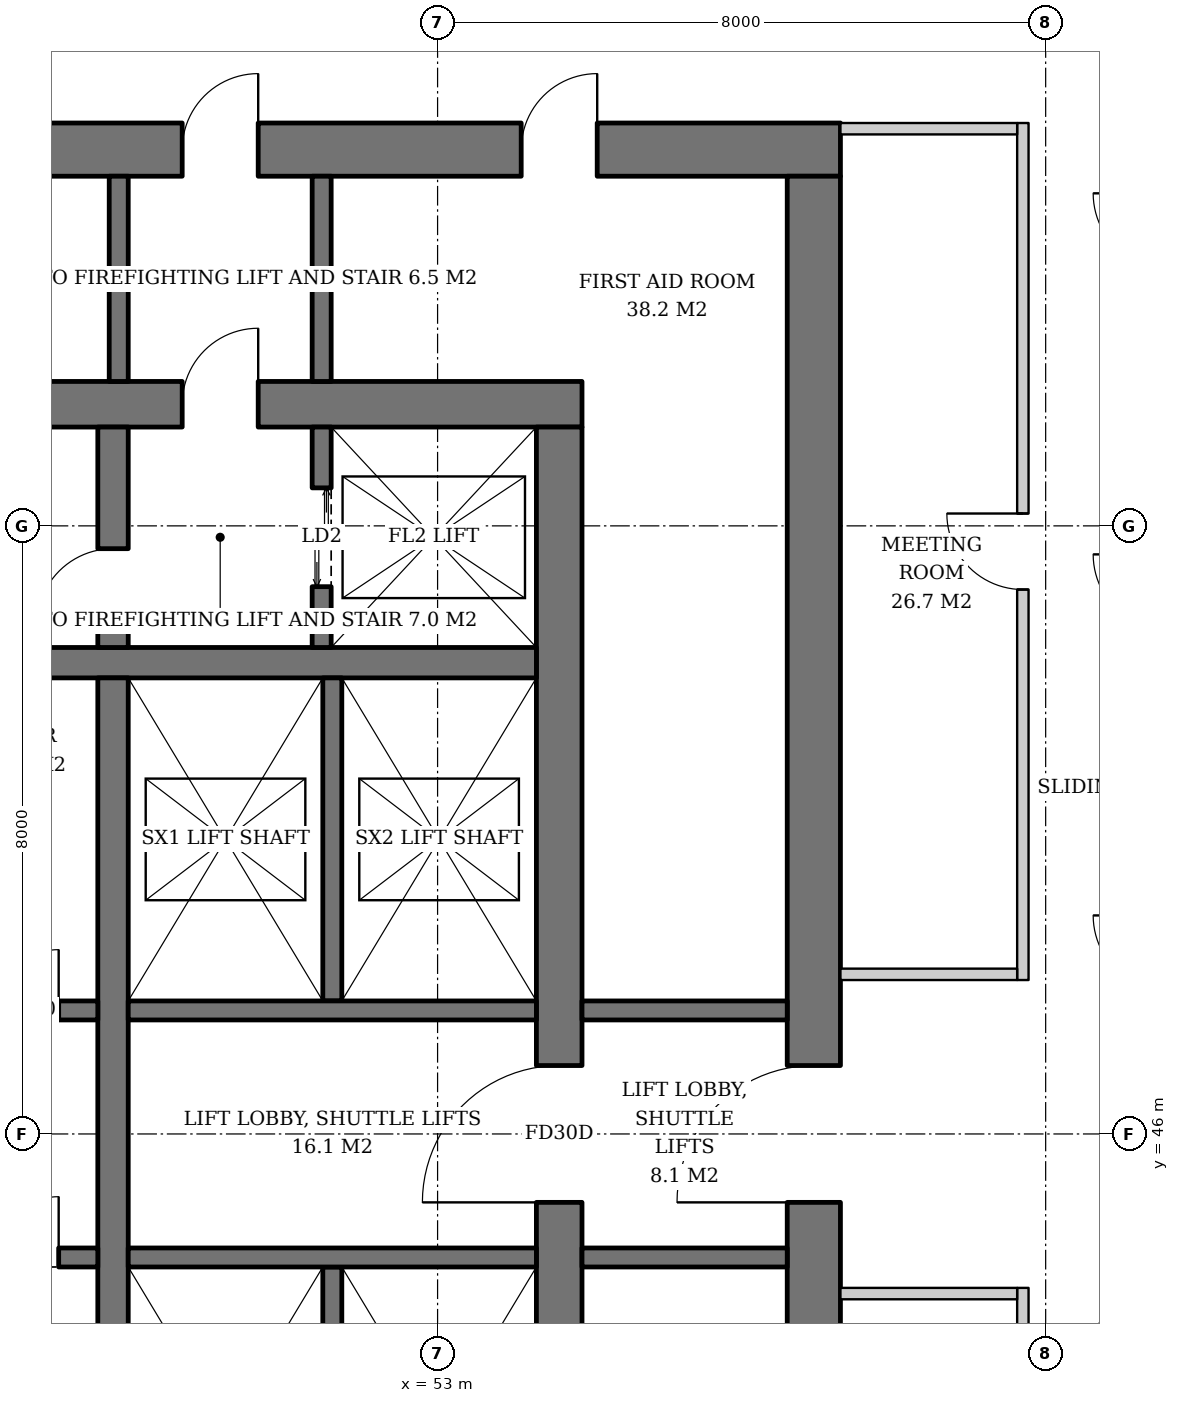
"""IFC4 building model, lengths in metres.
Left out: names, types, materials, properties, quantities, classifications, styles, units other than length and angle.
Written with IfcOpenShell. Run it as: python <this file> out.ifc"""

import sys

from ifc_helpers import new_model, si_unit, direction, frame, frame_2d, origin, place, context, subcontext, project, spatial, rectangle, extrude, element, fill, save


model = new_model("IFC4")
c1 = context("Model", 3, precision=1e-05, world=origin(), true_north=direction((0.0, 1.0)))
c2 = subcontext(c1, "Body", "Model", "MODEL_VIEW")
j1 = project(units=[si_unit("LENGTHUNIT", "METRE"), si_unit("PLANEANGLEUNIT", "RADIAN")], contexts=[c1])
p1 = place(None, origin())
s1 = spatial("IfcSite", under=j1, at=p1, CompositionType="ELEMENT")
p2 = place(p1, origin())
s2 = spatial("IfcBuilding", under=s1, at=p2, CompositionType="ELEMENT")
p3 = place(p2, frame((0.0, 0.0, 127.4)))
s3 = spatial("IfcBuildingStorey", under=s2, at=p3, CompositionType="ELEMENT", Elevation=127.4)
p4 = place(p3, frame((35.1, 55.6, 0.0), z_axis=(0.0, 0.0, 1.0), x_axis=(1.0, 0.0, 0.0)))
e1 = element("IfcWall", 1, at=p4, inside=s3, PredefinedType="SHEAR", context=c2, shape_type="SweptSolid", body=[
    extrude(rectangle(XDim=19.8, YDim=0.6, at=frame_2d((9.9, 0.0))), origin(), (0.0, 0.0, 1.0), 3.8),
])
p5 = place(p4, frame((14.54, 0.0, 0.0)))
e2 = element("IfcOpeningElement", 2, at=p5, cuts=e1, PredefinedType="OPENING", context=c2, shape_type="SweptSolid", body=[
    extrude(rectangle(XDim=1.0, YDim=2.1, at=frame_2d((0.5, 1.05))), frame((0.0, 0.31, 0.0), z_axis=(0.0, -1.0, 0.0), x_axis=(1.0, 0.0, 0.0)), (0.0, 0.0, 1.0), 0.62),
])
p6 = place(p4, frame((2.425, 0.0, 0.0)))
e3 = element("IfcOpeningElement", 3, at=p6, cuts=e1, PredefinedType="OPENING", context=c2, shape_type="SweptSolid", body=[
    extrude(rectangle(XDim=1.0, YDim=2.1, at=frame_2d((0.5, 1.05))), frame((0.0, 0.31, 0.0), z_axis=(0.0, -1.0, 0.0), x_axis=(1.0, 0.0, 0.0)), (0.0, 0.0, 1.0), 0.62),
])
p7 = place(p3, frame((54.6, 36.7, 0.0), z_axis=(0.0, 0.0, 1.0), x_axis=(0.0, 1.0, 0.0)))
e4 = element("IfcWall", 4, at=p7, inside=s3, PredefinedType="SHEAR", context=c2, shape_type="SweptSolid", body=[
    extrude(rectangle(XDim=18.6, YDim=0.6, at=frame_2d((9.3, 0.0))), origin(), (0.0, 0.0, 1.0), 3.8),
])
p8 = place(p7, frame((8.4, 0.0, 0.0)))
e5 = element("IfcOpeningElement", 5, at=p8, cuts=e4, PredefinedType="OPENING", context=c2, shape_type="SweptSolid", body=[
    extrude(rectangle(XDim=1.8, YDim=2.4, at=frame_2d((0.9, 1.2))), frame((0.0, 0.31, 0.0), z_axis=(0.0, -1.0, 0.0), x_axis=(1.0, 0.0, 0.0)), (0.0, 0.0, 1.0), 0.62),
])
p9 = place(p3, frame((31.7, 58.95, 0.0), z_axis=(0.0, 0.0, 1.0), x_axis=(1.0, 0.0, 0.0)))
e6 = element("IfcWall", 6, at=p9, inside=s3, PredefinedType="SHEAR", context=c2, shape_type="SweptSolid", body=[
    extrude(rectangle(XDim=26.6, YDim=0.7, at=frame_2d((13.3, 0.0))), origin(), (0.0, 0.0, 1.0), 3.8),
])
p10 = place(p9, frame((17.94, 0.0, 0.0)))
e7 = element("IfcOpeningElement", 7, at=p10, cuts=e6, PredefinedType="OPENING", context=c2, shape_type="SweptSolid", body=[
    extrude(rectangle(XDim=1.0, YDim=2.1, at=frame_2d((0.5, 1.05))), frame((0.0, 0.36, 0.0), z_axis=(0.0, -1.0, 0.0), x_axis=(1.0, 0.0, 0.0)), (0.0, 0.0, 1.0), 0.72),
])
p11 = place(p9, frame((5.825, 0.0, 0.0)))
e8 = element("IfcOpeningElement", 8, at=p11, cuts=e6, PredefinedType="OPENING", context=c2, shape_type="SweptSolid", body=[
    extrude(rectangle(XDim=1.0, YDim=2.1, at=frame_2d((0.5, 1.05))), frame((0.0, 0.36, 0.0), z_axis=(0.0, -1.0, 0.0), x_axis=(1.0, 0.0, 0.0)), (0.0, 0.0, 1.0), 0.72),
])
p12 = place(p9, frame((2.587, 0.0, 0.0)))
e9 = element("IfcOpeningElement", 9, at=p12, cuts=e6, PredefinedType="OPENING", context=c2, shape_type="SweptSolid", body=[
    extrude(rectangle(XDim=1.0, YDim=2.1, at=frame_2d((0.5, 1.05))), frame((0.0, 0.36, 0.0), z_axis=(0.0, -1.0, 0.0), x_axis=(1.0, 0.0, 0.0)), (0.0, 0.0, 1.0), 0.72),
])
p13 = place(p9, frame((8.44, 0.0, 0.0)))
e10 = element("IfcOpeningElement", 10, at=p13, cuts=e6, PredefinedType="OPENING", context=c2, shape_type="SweptSolid", body=[
    extrude(rectangle(XDim=1.0, YDim=2.1, at=frame_2d((0.5, 1.05))), frame((0.0, 0.36, 0.0), z_axis=(0.0, -1.0, 0.0), x_axis=(1.0, 0.0, 0.0)), (0.0, 0.0, 1.0), 0.72),
])
p14 = place(p9, frame((13.342, 0.0, 0.0)))
e11 = element("IfcOpeningElement", 11, at=p14, cuts=e6, PredefinedType="OPENING", context=c2, shape_type="SweptSolid", body=[
    extrude(rectangle(XDim=1.0, YDim=2.1, at=frame_2d((0.5, 1.05))), frame((0.0, 0.36, 0.0), z_axis=(0.0, -1.0, 0.0), x_axis=(1.0, 0.0, 0.0)), (0.0, 0.0, 1.0), 0.72),
])
p15 = place(p9, frame((22.4, 0.0, 0.0)))
e12 = element("IfcOpeningElement", 12, at=p15, cuts=e6, PredefinedType="OPENING", context=c2, shape_type="SweptSolid", body=[
    extrude(rectangle(XDim=1.0, YDim=2.1, at=frame_2d((0.5, 1.05))), frame((0.0, 0.36, 0.0), z_axis=(0.0, -1.0, 0.0), x_axis=(1.0, 0.0, 0.0)), (0.0, 0.0, 1.0), 0.72),
])
p16 = place(p3, frame((57.95, 33.4, 0.0), z_axis=(0.0, 0.0, 1.0), x_axis=(0.0, 1.0, 0.0)))
e13 = element("IfcWall", 13, at=p16, inside=s3, PredefinedType="SHEAR", context=c2, shape_type="SweptSolid", body=[
    extrude(rectangle(XDim=25.2, YDim=0.7, at=frame_2d((12.6, 0.0))), origin(), (0.0, 0.0, 1.0), 3.8),
])
p17 = place(p16, frame((11.7, 0.0, 0.0)))
e14 = element("IfcOpeningElement", 14, at=p17, cuts=e13, PredefinedType="OPENING", context=c2, shape_type="SweptSolid", body=[
    extrude(rectangle(XDim=1.8, YDim=2.4, at=frame_2d((0.9, 1.2))), frame((0.0, 0.36, 0.0), z_axis=(0.0, -1.0, 0.0), x_axis=(1.0, 0.0, 0.0)), (0.0, 0.0, 1.0), 0.72),
])
p18 = place(p3, frame((35.7, 52.2, 0.0), z_axis=(0.0, 0.0, 1.0), x_axis=(1.0, 0.0, 0.0)))
e15 = element("IfcWall", 15, at=p18, inside=s3, PredefinedType="SHEAR", context=c2, shape_type="SweptSolid", body=[
    extrude(rectangle(XDim=18.6, YDim=0.4, at=frame_2d((9.3, 0.0))), origin(), (0.0, 0.0, 1.0), 3.8),
])
p19 = place(p3, frame((48.73, 40.0, 0.0), z_axis=(0.0, 0.0, 1.0), x_axis=(0.0, 1.0, 0.0)))
e16 = element("IfcWall", 16, at=p19, inside=s3, PredefinedType="SHEAR", context=c2, shape_type="SweptSolid", body=[
    extrude(rectangle(XDim=12.0, YDim=0.4, at=frame_2d((6.0, 0.0))), origin(), (0.0, 0.0, 1.0), 3.8),
])
p20 = place(p3, frame((48.73, 52.4, 0.0), z_axis=(0.0, 0.0, 1.0), x_axis=(0.0, 1.0, 0.0)))
e17 = element("IfcWall", 17, at=p20, inside=s3, PredefinedType="SHEAR", context=c2, shape_type="SweptSolid", body=[
    extrude(rectangle(XDim=2.9, YDim=0.4, at=frame_2d((1.45, 0.0))), origin(), (0.0, 0.0, 1.0), 3.8),
])
p21 = place(p20, frame((0.3, 0.0, 0.0)))
e18 = element("IfcOpeningElement", 18, at=p21, cuts=e17, PredefinedType="OPENING", context=c2, shape_type="SweptSolid", body=[
    extrude(rectangle(XDim=1.0, YDim=2.1, at=frame_2d((0.5, 1.05))), frame((0.0, 0.21, 0.0), z_axis=(0.0, -1.0, 0.0), x_axis=(1.0, 0.0, 0.0)), (0.0, 0.0, 1.0), 0.42),
])
p22 = place(p3, frame((51.475, 52.4, 0.0), z_axis=(0.0, 0.0, 1.0), x_axis=(0.0, 1.0, 0.0)))
e19 = element("IfcWall", 19, at=p22, inside=s3, PredefinedType="SHEAR", context=c2, shape_type="SweptSolid", body=[
    extrude(rectangle(XDim=2.9, YDim=0.25, at=frame_2d((1.45, 0.0))), origin(), (0.0, 0.0, 1.0), 3.8),
])
p23 = place(p22, frame((0.8, 0.0, 0.0)))
e20 = element("IfcOpeningElement", 20, at=p23, cuts=e19, PredefinedType="OPENING", context=c2, shape_type="SweptSolid", body=[
    extrude(rectangle(XDim=1.3, YDim=2.2, at=frame_2d((0.65, 1.1))), frame((0.0, 0.135, 0.0), z_axis=(0.0, -1.0, 0.0), x_axis=(1.0, 0.0, 0.0)), (0.0, 0.0, 1.0), 0.27),
])
p24 = place(p3, frame((35.7, 47.625, 0.0), z_axis=(0.0, 0.0, 1.0), x_axis=(1.0, 0.0, 0.0)))
e21 = element("IfcWall", 21, at=p24, inside=s3, PredefinedType="SHEAR", context=c2, shape_type="SweptSolid", body=[
    extrude(rectangle(XDim=12.83, YDim=0.25, at=frame_2d((6.415, 0.0))), origin(), (0.0, 0.0, 1.0), 3.8),
])
p25 = place(p24, frame((0.7, 0.0, 0.0)))
e22 = element("IfcOpeningElement", 22, at=p25, cuts=e21, PredefinedType="OPENING", context=c2, shape_type="SweptSolid", body=[
    extrude(rectangle(XDim=1.1, YDim=2.2, at=frame_2d((0.55, 1.1))), frame((0.0, 0.135, 0.0), z_axis=(0.0, -1.0, 0.0), x_axis=(1.0, 0.0, 0.0)), (0.0, 0.0, 1.0), 0.27),
])
p26 = place(p24, frame((3.45, 0.0, 0.0)))
e23 = element("IfcOpeningElement", 23, at=p26, cuts=e21, PredefinedType="OPENING", context=c2, shape_type="SweptSolid", body=[
    extrude(rectangle(XDim=1.1, YDim=2.2, at=frame_2d((0.55, 1.1))), frame((0.0, 0.135, 0.0), z_axis=(0.0, -1.0, 0.0), x_axis=(1.0, 0.0, 0.0)), (0.0, 0.0, 1.0), 0.27),
])
p27 = place(p24, frame((6.2, 0.0, 0.0)))
e24 = element("IfcOpeningElement", 24, at=p27, cuts=e21, PredefinedType="OPENING", context=c2, shape_type="SweptSolid", body=[
    extrude(rectangle(XDim=1.1, YDim=2.2, at=frame_2d((0.55, 1.1))), frame((0.0, 0.135, 0.0), z_axis=(0.0, -1.0, 0.0), x_axis=(1.0, 0.0, 0.0)), (0.0, 0.0, 1.0), 0.27),
])
p28 = place(p24, frame((8.95, 0.0, 0.0)))
e25 = element("IfcOpeningElement", 25, at=p28, cuts=e21, PredefinedType="OPENING", context=c2, shape_type="SweptSolid", body=[
    extrude(rectangle(XDim=1.1, YDim=2.2, at=frame_2d((0.55, 1.1))), frame((0.0, 0.135, 0.0), z_axis=(0.0, -1.0, 0.0), x_axis=(1.0, 0.0, 0.0)), (0.0, 0.0, 1.0), 0.27),
])
p29 = place(p24, frame((11.515, 0.0, 0.0)))
e26 = element("IfcOpeningElement", 26, at=p29, cuts=e21, PredefinedType="OPENING", context=c2, shape_type="SweptSolid", body=[
    extrude(rectangle(XDim=0.8, YDim=2.0, at=frame_2d((0.4, 1.0))), frame((0.0, 0.135, 0.0), z_axis=(0.0, -1.0, 0.0), x_axis=(1.0, 0.0, 0.0)), (0.0, 0.0, 1.0), 0.27),
])
p30 = place(p3, frame((35.7, 44.375, 0.0), z_axis=(0.0, 0.0, 1.0), x_axis=(1.0, 0.0, 0.0)))
e27 = element("IfcWall", 27, at=p30, inside=s3, PredefinedType="SHEAR", context=c2, shape_type="SweptSolid", body=[
    extrude(rectangle(XDim=12.83, YDim=0.25, at=frame_2d((6.415, 0.0))), origin(), (0.0, 0.0, 1.0), 3.8),
])
p31 = place(p30, frame((0.7, 0.0, 0.0)))
e28 = element("IfcOpeningElement", 28, at=p31, cuts=e27, PredefinedType="OPENING", context=c2, shape_type="SweptSolid", body=[
    extrude(rectangle(XDim=1.1, YDim=2.2, at=frame_2d((0.55, 1.1))), frame((0.0, 0.135, 0.0), z_axis=(0.0, -1.0, 0.0), x_axis=(1.0, 0.0, 0.0)), (0.0, 0.0, 1.0), 0.27),
])
p32 = place(p30, frame((3.45, 0.0, 0.0)))
e29 = element("IfcOpeningElement", 29, at=p32, cuts=e27, PredefinedType="OPENING", context=c2, shape_type="SweptSolid", body=[
    extrude(rectangle(XDim=1.1, YDim=2.2, at=frame_2d((0.55, 1.1))), frame((0.0, 0.135, 0.0), z_axis=(0.0, -1.0, 0.0), x_axis=(1.0, 0.0, 0.0)), (0.0, 0.0, 1.0), 0.27),
])
p33 = place(p30, frame((6.2, 0.0, 0.0)))
e30 = element("IfcOpeningElement", 30, at=p33, cuts=e27, PredefinedType="OPENING", context=c2, shape_type="SweptSolid", body=[
    extrude(rectangle(XDim=1.1, YDim=2.2, at=frame_2d((0.55, 1.1))), frame((0.0, 0.135, 0.0), z_axis=(0.0, -1.0, 0.0), x_axis=(1.0, 0.0, 0.0)), (0.0, 0.0, 1.0), 0.27),
])
p34 = place(p30, frame((8.95, 0.0, 0.0)))
e31 = element("IfcOpeningElement", 31, at=p34, cuts=e27, PredefinedType="OPENING", context=c2, shape_type="SweptSolid", body=[
    extrude(rectangle(XDim=1.1, YDim=2.2, at=frame_2d((0.55, 1.1))), frame((0.0, 0.135, 0.0), z_axis=(0.0, -1.0, 0.0), x_axis=(1.0, 0.0, 0.0)), (0.0, 0.0, 1.0), 0.27),
])
p35 = place(p30, frame((11.515, 0.0, 0.0)))
e32 = element("IfcOpeningElement", 32, at=p35, cuts=e27, PredefinedType="OPENING", context=c2, shape_type="SweptSolid", body=[
    extrude(rectangle(XDim=0.8, YDim=2.0, at=frame_2d((0.4, 1.0))), frame((0.0, 0.135, 0.0), z_axis=(0.0, -1.0, 0.0), x_axis=(1.0, 0.0, 0.0)), (0.0, 0.0, 1.0), 0.27),
])
p36 = place(p3, frame((51.615, 47.75, 0.0), z_axis=(0.0, 0.0, 1.0), x_axis=(0.0, 1.0, 0.0)))
e33 = element("IfcWall", 33, at=p36, inside=s3, PredefinedType="SHEAR", context=c2, shape_type="SweptSolid", body=[
    extrude(rectangle(XDim=4.25, YDim=0.25, at=frame_2d((2.125, 0.0))), origin(), (0.0, 0.0, 1.0), 3.8),
])
p37 = place(p3, frame((48.93, 47.625, 0.0), z_axis=(0.0, 0.0, 1.0), x_axis=(1.0, 0.0, 0.0)))
e34 = element("IfcWall", 34, at=p37, inside=s3, PredefinedType="SHEAR", context=c2, shape_type="SweptSolid", body=[
    extrude(rectangle(XDim=5.37, YDim=0.25, at=frame_2d((2.685, 0.0))), origin(), (0.0, 0.0, 1.0), 3.8),
])
p38 = place(p3, frame((51.615, 44.25, 0.0), z_axis=(0.0, 0.0, 1.0), x_axis=(0.0, -1.0, 0.0)))
e35 = element("IfcWall", 35, at=p38, inside=s3, PredefinedType="SHEAR", context=c2, shape_type="SweptSolid", body=[
    extrude(rectangle(XDim=4.25, YDim=0.25, at=frame_2d((2.125, 0.0))), origin(), (0.0, 0.0, 1.0), 3.8),
])
p39 = place(p3, frame((48.93, 44.375, 0.0), z_axis=(0.0, 0.0, 1.0), x_axis=(1.0, 0.0, 0.0)))
e36 = element("IfcWall", 36, at=p39, inside=s3, PredefinedType="SHEAR", context=c2, shape_type="SweptSolid", body=[
    extrude(rectangle(XDim=5.37, YDim=0.25, at=frame_2d((2.685, 0.0))), origin(), (0.0, 0.0, 1.0), 3.8),
])
for number, where, z_axis, x_axis in (
    (37, (48.805, 55.9, 0.0), (0.0, 0.0, 1.0), (0.0, 1.0, 0.0)),
    (38, (51.475, 55.9, 0.0), (0.0, 0.0, 1.0), (0.0, 1.0, 0.0)),
    (39, (54.9, 44.375, 0.0), (0.0, 0.0, 1.0), (1.0, 0.0, 0.0)),
    (40, (54.9, 47.625, 0.0), (0.0, 0.0, 1.0), (1.0, 0.0, 0.0)),
):
    element("IfcWall", number, at=place(p3, frame(where, z_axis=z_axis, x_axis=x_axis)), inside=s3, PredefinedType="SOLIDWALL", context=c2, shape_type="SweptSolid", body=[
        extrude(rectangle(XDim=2.7, YDim=0.25, at=frame_2d((1.35, 0.0))), origin(), (0.0, 0.0, 1.0), 3.62),
    ])
p40 = place(p3, frame((60.7, 32.7, 0.0), z_axis=(0.0, 0.0, 1.0), x_axis=(0.0, 1.0, 0.0)))
e41 = element("IfcWall", 41, at=p40, inside=s3, PredefinedType="PARTITIONING", context=c2, shape_type="SweptSolid", body=[
    extrude(rectangle(XDim=11.275, YDim=0.15, at=frame_2d((5.638, 0.0))), origin(), (0.0, 0.0, 1.0), 2.72),
])
p41 = place(p40, frame((5.137, 0.0, 0.0)))
e42 = element("IfcOpeningElement", 42, at=p41, cuts=e41, PredefinedType="OPENING", context=c2, shape_type="SweptSolid", body=[
    extrude(rectangle(XDim=1.0, YDim=2.1, at=frame_2d((0.5, 1.05))), frame((0.0, 0.085, 0.0), z_axis=(0.0, -1.0, 0.0), x_axis=(1.0, 0.0, 0.0)), (0.0, 0.0, 1.0), 0.17),
])
p42 = place(p3, frame((58.3, 43.9, 0.0), z_axis=(0.0, 0.0, 1.0), x_axis=(1.0, 0.0, 0.0)))
e43 = element("IfcWall", 43, at=p42, inside=s3, PredefinedType="PARTITIONING", context=c2, shape_type="SweptSolid", body=[
    extrude(rectangle(XDim=2.325, YDim=0.15, at=frame_2d((1.163, 0.0))), origin(), (0.0, 0.0, 1.0), 3.62),
])
p43 = place(p3, frame((60.7, 48.025, 0.0), z_axis=(0.0, 0.0, 1.0), x_axis=(0.0, 1.0, 0.0)))
e44 = element("IfcWall", 44, at=p43, inside=s3, PredefinedType="PARTITIONING", context=c2, shape_type="SweptSolid", body=[
    extrude(rectangle(XDim=11.275, YDim=0.15, at=frame_2d((5.638, 0.0))), origin(), (0.0, 0.0, 1.0), 2.806),
])
p44 = place(p43, frame((5.137, 0.0, 0.0)))
e45 = element("IfcOpeningElement", 45, at=p44, cuts=e44, PredefinedType="OPENING", context=c2, shape_type="SweptSolid", body=[
    extrude(rectangle(XDim=1.0, YDim=2.1, at=frame_2d((0.5, 1.05))), frame((0.0, 0.085, 0.0), z_axis=(0.0, -1.0, 0.0), x_axis=(1.0, 0.0, 0.0)), (0.0, 0.0, 1.0), 0.17),
])
for number, where, z_axis, x_axis in (
    (46, (58.3, 48.1, 0.0), (0.0, 0.0, 1.0), (1.0, 0.0, 0.0)),
    (47, (58.3, 59.225, 0.0), (0.0, 0.0, 1.0), (1.0, 0.0, 0.0)),
):
    element("IfcWall", number, at=place(p3, frame(where, z_axis=z_axis, x_axis=x_axis)), inside=s3, PredefinedType="PARTITIONING", context=c2, shape_type="SweptSolid", body=[
        extrude(rectangle(XDim=2.325, YDim=0.15, at=frame_2d((1.163, 0.0))), origin(), (0.0, 0.0, 1.0), 3.62),
    ])
p45 = place(p23, origin())
e48 = element("IfcDoor", 48, at=p45, inside=s3, OperationType="DOUBLE_DOOR_SLIDING", PredefinedType="DOOR", context=c2, shape_type="SweptSolid", body=[
    extrude(rectangle(XDim=1.3, YDim=2.2, at=frame_2d((0.65, 1.1))), frame((0.0, 0.025, 0.0), z_axis=(0.0, -1.0, 0.0), x_axis=(1.0, 0.0, 0.0)), (0.0, 0.0, 1.0), 0.05),
])
fill(e20, e48)
p46 = place(p29, origin())
e49 = element("IfcDoor", 49, at=p46, inside=s3, OperationType="SINGLE_SWING_RIGHT", PredefinedType="DOOR", context=c2, shape_type="SweptSolid", body=[
    extrude(rectangle(XDim=0.8, YDim=2.0, at=frame_2d((0.4, 1.0))), frame((0.0, 0.025, 0.0), z_axis=(0.0, -1.0, 0.0), x_axis=(1.0, 0.0, 0.0)), (0.0, 0.0, 1.0), 0.05),
])
fill(e26, e49)
p47 = place(p35, origin())
e50 = element("IfcDoor", 50, at=p47, inside=s3, OperationType="SINGLE_SWING_RIGHT", PredefinedType="DOOR", context=c2, shape_type="SweptSolid", body=[
    extrude(rectangle(XDim=0.8, YDim=2.0, at=frame_2d((0.4, 1.0))), frame((0.0, 0.025, 0.0), z_axis=(0.0, -1.0, 0.0), x_axis=(1.0, 0.0, 0.0)), (0.0, 0.0, 1.0), 0.05),
])
fill(e32, e50)
p48 = place(p21, origin())
e51 = element("IfcDoor", 51, at=p48, inside=s3, OperationType="SINGLE_SWING_LEFT", PredefinedType="DOOR", context=c2, shape_type="SweptSolid", body=[
    extrude(rectangle(XDim=1.0, YDim=2.1, at=frame_2d((0.5, 1.05))), frame((0.0, 0.025, 0.0), z_axis=(0.0, -1.0, 0.0), x_axis=(1.0, 0.0, 0.0)), (0.0, 0.0, 1.0), 0.05),
])
fill(e18, e51)
p49 = place(p5, origin())
e52 = element("IfcDoor", 52, at=p49, inside=s3, OperationType="SINGLE_SWING_RIGHT", PredefinedType="DOOR", context=c2, shape_type="SweptSolid", body=[
    extrude(rectangle(XDim=1.0, YDim=2.1, at=frame_2d((0.5, 1.05))), frame((0.0, 0.025, 0.0), z_axis=(0.0, -1.0, 0.0), x_axis=(1.0, 0.0, 0.0)), (0.0, 0.0, 1.0), 0.05),
])
fill(e2, e52)
p50 = place(p8, origin())
e53 = element("IfcDoor", 53, at=p50, inside=s3, OperationType="DOUBLE_DOOR_SINGLE_SWING", PredefinedType="DOOR", context=c2, shape_type="SweptSolid", body=[
    extrude(rectangle(XDim=1.8, YDim=2.4, at=frame_2d((0.9, 1.2))), frame((0.0, 0.025, 0.0), z_axis=(0.0, -1.0, 0.0), x_axis=(1.0, 0.0, 0.0)), (0.0, 0.0, 1.0), 0.05),
])
fill(e5, e53)
p51 = place(p17, origin())
e54 = element("IfcDoor", 54, at=p51, inside=s3, OperationType="DOUBLE_DOOR_SINGLE_SWING", PredefinedType="DOOR", context=c2, shape_type="SweptSolid", body=[
    extrude(rectangle(XDim=1.8, YDim=2.4, at=frame_2d((0.9, 1.2))), frame((0.0, 0.025, 0.0), z_axis=(0.0, -1.0, 0.0), x_axis=(1.0, 0.0, 0.0)), (0.0, 0.0, 1.0), 0.05),
])
fill(e14, e54)
p52 = place(p10, origin())
e55 = element("IfcDoor", 55, at=p52, inside=s3, OperationType="SINGLE_SWING_RIGHT", PredefinedType="DOOR", context=c2, shape_type="SweptSolid", body=[
    extrude(rectangle(XDim=1.0, YDim=2.1, at=frame_2d((0.5, 1.05))), frame((0.0, 0.025, 0.0), z_axis=(0.0, -1.0, 0.0), x_axis=(1.0, 0.0, 0.0)), (0.0, 0.0, 1.0), 0.05),
])
fill(e7, e55)
p53 = place(p15, origin())
e56 = element("IfcDoor", 56, at=p53, inside=s3, OperationType="SINGLE_SWING_RIGHT", PredefinedType="DOOR", context=c2, shape_type="SweptSolid", body=[
    extrude(rectangle(XDim=1.0, YDim=2.1, at=frame_2d((0.5, 1.05))), frame((0.0, -0.29, 0.0), z_axis=(0.0, -1.0, 0.0), x_axis=(1.0, 0.0, 0.0)), (0.0, 0.0, 1.0), 0.05),
])
fill(e12, e56)
p54 = place(p44, origin())
e57 = element("IfcDoor", 57, at=p54, inside=s3, OperationType="SINGLE_SWING_RIGHT", PredefinedType="DOOR", context=c2, shape_type="SweptSolid", body=[
    extrude(rectangle(XDim=1.0, YDim=2.1, at=frame_2d((0.5, 1.05))), frame((0.0, 0.025, 0.0), z_axis=(0.0, -1.0, 0.0), x_axis=(1.0, 0.0, 0.0)), (0.0, 0.0, 1.0), 0.05),
])
fill(e45, e57)
save(model, sys.argv[1])
